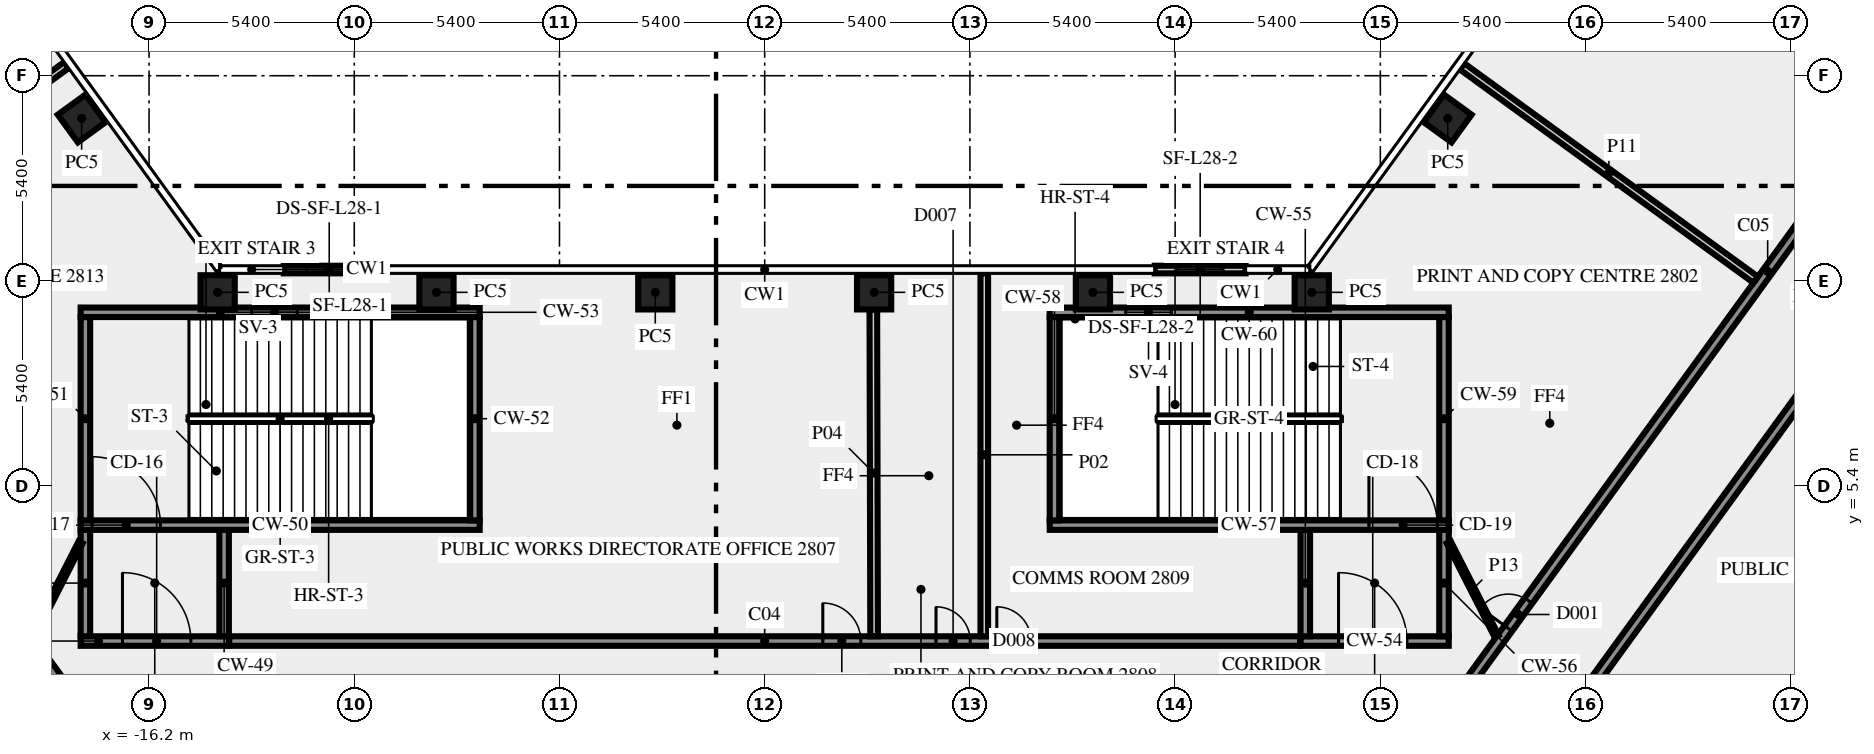
"""IFC4 building model, lengths in metres.
Left out: names, types, materials, properties, quantities, classifications, styles, units other than length and angle.
Written with IfcOpenShell. Run it as: python <this file> out.ifc"""

import sys

from ifc_helpers import new_model, si_unit, direction, frame, frame_2d, origin, origin_2d, place, context, subcontext, project, spatial, rectangle, extrude, element, fill, save


model = new_model("IFC4")
c1 = context("Model", 3, precision=1e-05, world=origin(), true_north=direction((0.0, 1.0)))
c2 = subcontext(c1, "Body", "Model", "MODEL_VIEW")
j1 = project(units=[si_unit("LENGTHUNIT", "METRE"), si_unit("PLANEANGLEUNIT", "RADIAN")], contexts=[c1])
p1 = place(None, origin())
s1 = spatial("IfcSite", under=j1, at=p1, CompositionType="ELEMENT")
p2 = place(p1, origin())
s2 = spatial("IfcBuilding", under=s1, at=p2, CompositionType="ELEMENT")
p3 = place(p2, frame((0.0, 0.0, 121.0)))
s3 = spatial("IfcBuildingStorey", under=s2, at=p3, CompositionType="ELEMENT", Elevation=121.0)
for number, where, z_axis, x_axis in (
    (1, (-17.974, 15.075, 0.0), (0.0, 0.0, 1.0), (-0.588, 0.809, 0.0)),
    (2, (17.974, 15.075, 0.0), (0.0, 0.0, 1.0), (-0.588, -0.809, 0.0)),
    (3, (14.395, 10.5, 0.0), (0.0, 0.0, 1.0), (-1.0, 0.0, 0.0)),
    (4, (8.637, 10.5, 0.0), (0.0, 0.0, 1.0), (-1.0, 0.0, 0.0)),
    (5, (2.879, 10.5, 0.0), (0.0, 0.0, 1.0), (-1.0, 0.0, 0.0)),
    (6, (-2.879, 10.5, 0.0), (0.0, 0.0, 1.0), (-1.0, 0.0, 0.0)),
    (7, (-8.637, 10.5, 0.0), (0.0, 0.0, 1.0), (-1.0, 0.0, 0.0)),
    (8, (-14.395, 10.5, 0.0), (0.0, 0.0, 1.0), (-1.0, 0.0, 0.0)),
):
    element("IfcColumn", number, at=place(p3, frame(where, z_axis=z_axis, x_axis=x_axis)), inside=s3, PredefinedType="COLUMN", context=c2, shape_type="SweptSolid", body=[
        extrude(rectangle(XDim=0.9, YDim=0.9, at=origin_2d()), origin(), (0.0, 0.0, 1.0), 3.65),
    ])
p4 = place(p3, frame((12.655, 11.1, 0.0), z_axis=(0.0, 0.0, 1.0), x_axis=(-1.0, 0.0, 0.0)))
e9 = element("IfcWall", 9, at=p4, inside=s3, PredefinedType="SOLIDWALL", context=c2, shape_type="SweptSolid", body=[
    extrude(rectangle(XDim=2.392, YDim=0.2, at=frame_2d((1.196, 0.0))), origin(), (0.0, 0.0, 1.0), 3.65),
])
p5 = place(p4, frame((0.596, 0.0, 1.0)))
e10 = element("IfcOpeningElement", 10, at=p5, cuts=e9, PredefinedType="OPENING", context=c2, shape_type="SweptSolid", body=[
    extrude(rectangle(XDim=1.2, YDim=1.2, at=frame_2d((0.6, 0.6))), frame((0.0, 0.11, 0.0), z_axis=(0.0, -1.0, 0.0), x_axis=(1.0, 0.0, 0.0)), (0.0, 0.0, 1.0), 0.22),
])
p6 = place(p3, frame((-10.263, 11.1, 0.0), z_axis=(0.0, 0.0, 1.0), x_axis=(-1.0, 0.0, 0.0)))
e11 = element("IfcWall", 11, at=p6, inside=s3, PredefinedType="SOLIDWALL", context=c2, shape_type="SweptSolid", body=[
    extrude(rectangle(XDim=2.392, YDim=0.2, at=frame_2d((1.196, 0.0))), origin(), (0.0, 0.0, 1.0), 3.65),
])
p7 = place(p6, frame((0.596, 0.0, 1.0)))
e12 = element("IfcOpeningElement", 12, at=p7, cuts=e11, PredefinedType="OPENING", context=c2, shape_type="SweptSolid", body=[
    extrude(rectangle(XDim=1.2, YDim=1.2, at=frame_2d((0.6, 0.6))), frame((0.0, 0.11, 0.0), z_axis=(0.0, -1.0, 0.0), x_axis=(1.0, 0.0, 0.0)), (0.0, 0.0, 1.0), 0.22),
])
p8 = place(p3, frame((-18.0, 1.325, 0.0), z_axis=(0.0, 0.0, 1.0), x_axis=(1.0, 0.0, 0.0)))
e13 = element("IfcWall", 13, at=p8, inside=s3, PredefinedType="SHEAR", context=c2, shape_type="SweptSolid", body=[
    extrude(rectangle(XDim=3.9, YDim=0.25, at=frame_2d((1.95, 0.0))), origin(), (0.0, 0.0, 1.0), 3.65),
])
p9 = place(p8, frame((1.1, 0.0, 0.0)))
e14 = element("IfcOpeningElement", 14, at=p9, cuts=e13, PredefinedType="OPENING", context=c2, shape_type="SweptSolid", body=[
    extrude(rectangle(XDim=1.8, YDim=2.1, at=frame_2d((0.9, 1.05))), frame((0.0, 0.135, 0.0), z_axis=(0.0, -1.0, 0.0), x_axis=(1.0, 0.0, 0.0)), (0.0, 0.0, 1.0), 0.27),
])
for number, where, z_axis, x_axis in (
    (15, (-17.875, 1.45, 0.0), (0.0, 0.0, 1.0), (0.0, 1.0, 0.0)),
    (16, (-14.225, 1.45, 0.0), (0.0, 0.0, 1.0), (0.0, 1.0, 0.0)),
):
    element("IfcWall", number, at=place(p3, frame(where, z_axis=z_axis, x_axis=x_axis)), inside=s3, PredefinedType="SHEAR", context=c2, shape_type="SweptSolid", body=[
        extrude(rectangle(XDim=2.8, YDim=0.25, at=frame_2d((1.4, 0.0))), origin(), (0.0, 0.0, 1.0), 3.65),
    ])
p10 = place(p3, frame((-18.0, 4.375, 0.0), z_axis=(0.0, 0.0, 1.0), x_axis=(1.0, 0.0, 0.0)))
e17 = element("IfcWall", 17, at=p10, inside=s3, PredefinedType="SHEAR", context=c2, shape_type="SweptSolid", body=[
    extrude(rectangle(XDim=10.5, YDim=0.25, at=frame_2d((5.25, 0.0))), origin(), (0.0, 0.0, 1.0), 3.65),
])
p11 = place(p10, frame((0.3, 0.0, 0.0)))
e18 = element("IfcOpeningElement", 18, at=p11, cuts=e17, PredefinedType="OPENING", context=c2, shape_type="SweptSolid", body=[
    extrude(rectangle(XDim=1.8, YDim=2.1, at=frame_2d((0.9, 1.05))), frame((0.0, 0.135, 0.0), z_axis=(0.0, -1.0, 0.0), x_axis=(1.0, 0.0, 0.0)), (0.0, 0.0, 1.0), 0.27),
])
for number, where, z_axis, x_axis in (
    (19, (-17.875, 4.5, 0.0), (0.0, 0.0, 1.0), (0.0, 1.0, 0.0)),
    (20, (-7.625, 4.5, 0.0), (0.0, 0.0, 1.0), (0.0, 1.0, 0.0)),
):
    element("IfcWall", number, at=place(p3, frame(where, z_axis=z_axis, x_axis=x_axis)), inside=s3, PredefinedType="SHEAR", context=c2, shape_type="SweptSolid", body=[
        extrude(rectangle(XDim=5.35, YDim=0.25, at=frame_2d((2.675, 0.0))), origin(), (0.0, 0.0, 1.0), 3.65),
    ])
p12 = place(p3, frame((-18.0, 9.975, 0.0), z_axis=(0.0, 0.0, 1.0), x_axis=(1.0, 0.0, 0.0)))
e21 = element("IfcWall", 21, at=p12, inside=s3, PredefinedType="SHEAR", context=c2, shape_type="SweptSolid", body=[
    extrude(rectangle(XDim=10.5, YDim=0.25, at=frame_2d((5.25, 0.0))), origin(), (0.0, 0.0, 1.0), 3.65),
])
p13 = place(p12, frame((4.5, 0.0, 1.0)))
e22 = element("IfcOpeningElement", 22, at=p13, cuts=e21, PredefinedType="OPENING", context=c2, shape_type="SweptSolid", body=[
    extrude(rectangle(XDim=1.2, YDim=1.2, at=frame_2d((0.6, 0.6))), frame((0.0, 0.135, 0.0), z_axis=(0.0, -1.0, 0.0), x_axis=(1.0, 0.0, 0.0)), (0.0, 0.0, 1.0), 0.27),
])
p14 = place(p3, frame((14.1, 1.325, 0.0), z_axis=(0.0, 0.0, 1.0), x_axis=(1.0, 0.0, 0.0)))
e23 = element("IfcWall", 23, at=p14, inside=s3, PredefinedType="SHEAR", context=c2, shape_type="SweptSolid", body=[
    extrude(rectangle(XDim=3.9, YDim=0.25, at=frame_2d((1.95, 0.0))), origin(), (0.0, 0.0, 1.0), 3.65),
])
p15 = place(p14, frame((1.0, 0.0, 0.0)))
e24 = element("IfcOpeningElement", 24, at=p15, cuts=e23, PredefinedType="OPENING", context=c2, shape_type="SweptSolid", body=[
    extrude(rectangle(XDim=1.8, YDim=2.1, at=frame_2d((0.9, 1.05))), frame((0.0, 0.135, 0.0), z_axis=(0.0, -1.0, 0.0), x_axis=(1.0, 0.0, 0.0)), (0.0, 0.0, 1.0), 0.27),
])
for number, where, z_axis, x_axis in (
    (25, (14.225, 1.45, 0.0), (0.0, 0.0, 1.0), (0.0, 1.0, 0.0)),
    (26, (17.875, 1.45, 0.0), (0.0, 0.0, 1.0), (0.0, 1.0, 0.0)),
):
    element("IfcWall", number, at=place(p3, frame(where, z_axis=z_axis, x_axis=x_axis)), inside=s3, PredefinedType="SHEAR", context=c2, shape_type="SweptSolid", body=[
        extrude(rectangle(XDim=2.8, YDim=0.25, at=frame_2d((1.4, 0.0))), origin(), (0.0, 0.0, 1.0), 3.65),
    ])
p16 = place(p3, frame((7.5, 4.375, 0.0), z_axis=(0.0, 0.0, 1.0), x_axis=(1.0, 0.0, 0.0)))
e27 = element("IfcWall", 27, at=p16, inside=s3, PredefinedType="SHEAR", context=c2, shape_type="SweptSolid", body=[
    extrude(rectangle(XDim=10.5, YDim=0.25, at=frame_2d((5.25, 0.0))), origin(), (0.0, 0.0, 1.0), 3.65),
])
p17 = place(p16, frame((8.4, 0.0, 0.0)))
e28 = element("IfcOpeningElement", 28, at=p17, cuts=e27, PredefinedType="OPENING", context=c2, shape_type="SweptSolid", body=[
    extrude(rectangle(XDim=1.8, YDim=2.1, at=frame_2d((0.9, 1.05))), frame((0.0, 0.135, 0.0), z_axis=(0.0, -1.0, 0.0), x_axis=(1.0, 0.0, 0.0)), (0.0, 0.0, 1.0), 0.27),
])
for number, where, z_axis, x_axis in (
    (29, (7.625, 4.5, 0.0), (0.0, 0.0, 1.0), (0.0, 1.0, 0.0)),
    (30, (17.875, 4.5, 0.0), (0.0, 0.0, 1.0), (0.0, 1.0, 0.0)),
):
    element("IfcWall", number, at=place(p3, frame(where, z_axis=z_axis, x_axis=x_axis)), inside=s3, PredefinedType="SHEAR", context=c2, shape_type="SweptSolid", body=[
        extrude(rectangle(XDim=5.35, YDim=0.25, at=frame_2d((2.675, 0.0))), origin(), (0.0, 0.0, 1.0), 3.65),
    ])
p18 = place(p3, frame((7.5, 9.975, 0.0), z_axis=(0.0, 0.0, 1.0), x_axis=(1.0, 0.0, 0.0)))
e31 = element("IfcWall", 31, at=p18, inside=s3, PredefinedType="SHEAR", context=c2, shape_type="SweptSolid", body=[
    extrude(rectangle(XDim=10.5, YDim=0.25, at=frame_2d((5.25, 0.0))), origin(), (0.0, 0.0, 1.0), 3.65),
])
p19 = place(p18, frame((2.0, 0.0, 1.0)))
e32 = element("IfcOpeningElement", 32, at=p19, cuts=e31, PredefinedType="OPENING", context=c2, shape_type="SweptSolid", body=[
    extrude(rectangle(XDim=1.2, YDim=1.2, at=frame_2d((0.6, 0.6))), frame((0.0, 0.135, 0.0), z_axis=(0.0, -1.0, 0.0), x_axis=(1.0, 0.0, 0.0)), (0.0, 0.0, 1.0), 0.27),
])
p20 = place(p3, frame((-37.232, 25.972, 0.0), z_axis=(0.0, 0.0, 1.0), x_axis=(0.587786323093, -0.809016216391, 0.0)))
e33 = element("IfcWall", 33, at=p20, inside=s3, PredefinedType="SOLIDWALL", context=c2, shape_type="SweptSolid", body=[
    extrude(rectangle(XDim=33.493, YDim=0.25, at=frame_2d((16.747, 0.0))), origin(), (0.0, 0.0, 1.0), 3.65),
])
p21 = place(p20, frame((9.785, 0.0, 0.0)))
e34 = element("IfcOpeningElement", 34, at=p21, cuts=e33, PredefinedType="OPENING", context=c2, shape_type="SweptSolid", body=[
    extrude(rectangle(XDim=1.8, YDim=2.1, at=frame_2d((0.9, 1.05))), frame((0.0, 0.135, 0.0), z_axis=(0.0, -1.0, 0.0), x_axis=(1.0, 0.0, 0.0)), (0.0, 0.0, 1.0), 0.27),
])
p22 = place(p20, frame((29.152, 0.0, 0.0)))
e35 = element("IfcOpeningElement", 35, at=p22, cuts=e33, PredefinedType="OPENING", context=c2, shape_type="SweptSolid", body=[
    extrude(rectangle(XDim=0.9, YDim=2.1, at=frame_2d((0.45, 1.05))), frame((0.0, 0.135, 0.0), z_axis=(0.0, -1.0, 0.0), x_axis=(1.0, 0.0, 0.0)), (0.0, 0.0, 1.0), 0.27),
])
p23 = place(p20, frame((1.335, 0.0, 0.0)))
e36 = element("IfcOpeningElement", 36, at=p23, cuts=e33, PredefinedType="OPENING", context=c2, shape_type="SweptSolid", body=[
    extrude(rectangle(XDim=0.9, YDim=2.1, at=frame_2d((0.45, 1.05))), frame((0.0, 0.135, 0.0), z_axis=(0.0, -1.0, 0.0), x_axis=(1.0, 0.0, 0.0)), (0.0, 0.0, 1.0), 0.27),
])
p24 = place(p3, frame((-14.09, 1.325, 0.0), z_axis=(0.0, 0.0, 1.0), x_axis=(1.0, 0.0, 0.0)))
e37 = element("IfcWall", 37, at=p24, inside=s3, PredefinedType="SOLIDWALL", context=c2, shape_type="SweptSolid", body=[
    extrude(rectangle(XDim=28.18, YDim=0.25, at=frame_2d((14.09, 0.0))), origin(), (0.0, 0.0, 1.0), 3.65),
])
p25 = place(p24, frame((20.198, 0.0, 0.0)))
e38 = element("IfcOpeningElement", 38, at=p25, cuts=e37, PredefinedType="OPENING", context=c2, shape_type="SweptSolid", body=[
    extrude(rectangle(XDim=0.9, YDim=2.1, at=frame_2d((0.45, 1.05))), frame((0.0, 0.135, 0.0), z_axis=(0.0, -1.0, 0.0), x_axis=(1.0, 0.0, 0.0)), (0.0, 0.0, 1.0), 0.27),
])
p26 = place(p24, frame((15.619, 0.0, 0.0)))
e39 = element("IfcOpeningElement", 39, at=p26, cuts=e37, PredefinedType="OPENING", context=c2, shape_type="SweptSolid", body=[
    extrude(rectangle(XDim=1.0, YDim=2.1, at=frame_2d((0.5, 1.05))), frame((0.0, 0.135, 0.0), z_axis=(0.0, -1.0, 0.0), x_axis=(1.0, 0.0, 0.0)), (0.0, 0.0, 1.0), 0.27),
])
p27 = place(p24, frame((18.598, 0.0, 0.0)))
e40 = element("IfcOpeningElement", 40, at=p27, cuts=e37, PredefinedType="OPENING", context=c2, shape_type="SweptSolid", body=[
    extrude(rectangle(XDim=0.9, YDim=2.1, at=frame_2d((0.45, 1.05))), frame((0.0, 0.135, 0.0), z_axis=(0.0, -1.0, 0.0), x_axis=(1.0, 0.0, 0.0)), (0.0, 0.0, 1.0), 0.27),
])
p28 = place(p3, frame((17.545, -1.125, 0.0), z_axis=(0.0, 0.0, 1.0), x_axis=(0.587786330937, 0.809016210693, 0.0)))
e41 = element("IfcWall", 41, at=p28, inside=s3, PredefinedType="SOLIDWALL", context=c2, shape_type="SweptSolid", body=[
    extrude(rectangle(XDim=30.103, YDim=0.25, at=frame_2d((15.052, 0.0))), origin(), (0.0, 0.0, 1.0), 3.65),
])
p29 = place(p28, frame((3.441, 0.0, 0.0)))
e42 = element("IfcOpeningElement", 42, at=p29, cuts=e41, PredefinedType="OPENING", context=c2, shape_type="SweptSolid", body=[
    extrude(rectangle(XDim=0.9, YDim=2.1, at=frame_2d((0.45, 1.05))), frame((0.0, 0.135, 0.0), z_axis=(0.0, -1.0, 0.0), x_axis=(1.0, 0.0, 0.0)), (0.0, 0.0, 1.0), 0.27),
])
p30 = place(p28, frame((28.729, 0.0, 0.0)))
e43 = element("IfcOpeningElement", 43, at=p30, cuts=e41, PredefinedType="OPENING", context=c2, shape_type="SweptSolid", body=[
    extrude(rectangle(XDim=0.9, YDim=2.1, at=frame_2d((0.45, 1.05))), frame((0.0, 0.135, 0.0), z_axis=(0.0, -1.0, 0.0), x_axis=(1.0, 0.0, 0.0)), (0.0, 0.0, 1.0), 0.27),
])
p31 = place(p3, frame((37.236, 21.469, 0.0), z_axis=(0.0, 0.0, 1.0), x_axis=(-0.58778344073, -0.809018310549, 0.0)))
e44 = element("IfcWall", 44, at=p31, inside=s3, PredefinedType="SOLIDWALL", context=c2, shape_type="SweptSolid", body=[
    extrude(rectangle(XDim=28.42, YDim=0.25, at=frame_2d((14.21, 0.0))), origin(), (0.0, 0.0, 1.0), 3.65),
])
p32 = place(p31, frame((13.205, 0.0, 0.0)))
e45 = element("IfcOpeningElement", 45, at=p32, cuts=e44, PredefinedType="OPENING", context=c2, shape_type="SweptSolid", body=[
    extrude(rectangle(XDim=1.0, YDim=2.1, at=frame_2d((0.5, 1.05))), frame((0.0, 0.135, 0.0), z_axis=(0.0, -1.0, 0.0), x_axis=(1.0, 0.0, 0.0)), (0.0, 0.0, 1.0), 0.27),
])
p33 = place(p31, frame((0.224, 0.0, 0.0)))
e46 = element("IfcOpeningElement", 46, at=p33, cuts=e44, PredefinedType="OPENING", context=c2, shape_type="SweptSolid", body=[
    extrude(rectangle(XDim=0.9, YDim=2.1, at=frame_2d((0.45, 1.05))), frame((0.0, 0.135, 0.0), z_axis=(0.0, -1.0, 0.0), x_axis=(1.0, 0.0, 0.0)), (0.0, 0.0, 1.0), 0.27),
])
p34 = place(p3, frame((5.778, 11.0, 0.0), z_axis=(0.0, 0.0, 1.0), x_axis=(0.0, -1.0, 0.0)))
e47 = element("IfcWall", 47, at=p34, inside=s3, PredefinedType="SOLIDWALL", context=c2, shape_type="SweptSolid", body=[
    extrude(rectangle(XDim=9.55, YDim=0.2, at=frame_2d((4.775, 0.0))), origin(), (0.0, 0.0, 1.0), 2.75),
])
p35 = place(p3, frame((2.879, 1.45, 0.0), z_axis=(0.0, 0.0, 1.0), x_axis=(-0.002357613104, 0.999997220826, 0.0)))
e48 = element("IfcWall", 48, at=p35, inside=s3, PredefinedType="SOLIDWALL", context=c2, shape_type="SweptSolid", body=[
    extrude(rectangle(XDim=8.595, YDim=0.2, at=frame_2d((4.297, 0.0))), origin(), (0.0, 0.0, 1.0), 3.65),
])
p36 = place(p3, frame((-26.089, 10.848, 0.0), z_axis=(0.0, 0.0, 1.0), x_axis=(0.807661302092, 0.589646691759, 0.0)))
e49 = element("IfcWall", 49, at=p36, inside=s3, PredefinedType="SOLIDWALL", context=c2, shape_type="SweptSolid", body=[
    extrude(rectangle(XDim=9.55, YDim=0.2, at=frame_2d((4.775, 0.0))), origin(), (0.0, 0.0, 1.0), 2.75),
])
p37 = place(p3, frame((26.077, 10.832, 0.0), z_axis=(0.0, 0.0, 1.0), x_axis=(-0.809052142986, 0.587736871338, 0.0)))
e50 = element("IfcWall", 50, at=p37, inside=s3, PredefinedType="SOLIDWALL", context=c2, shape_type="SweptSolid", body=[
    extrude(rectangle(XDim=9.55, YDim=0.2, at=frame_2d((4.775, 0.0))), origin(), (0.0, 0.0, 1.0), 2.75),
])
for number, where, z_axis, x_axis in (
    (51, (18.0, 3.925, 0.0), (0.0, 0.0, 1.0), (0.454, -0.891, 0.0)),
    (52, (-19.261, 1.45, 0.0), (0.0, 0.0, 1.0), (0.454, 0.891, 0.0)),
):
    element("IfcWall", number, at=place(p3, frame(where, z_axis=z_axis, x_axis=x_axis)), inside=s3, PredefinedType="PARTITIONING", context=c2, shape_type="SweptSolid", body=[
        extrude(rectangle(XDim=2.778, YDim=0.12, at=frame_2d((1.389, 0.0))), origin(), (0.0, 0.0, 1.0), 3.65),
    ])
p38 = place(p5, origin())
e53 = element("IfcWindow", 53, at=p38, inside=s3, PartitioningType="SINGLE_PANEL", PredefinedType="WINDOW", context=c2, shape_type="SweptSolid", body=[
    extrude(rectangle(XDim=1.2, YDim=1.2, at=frame_2d((0.6, 0.6))), frame((0.0, 0.03, 0.0), z_axis=(0.0, -1.0, 0.0), x_axis=(1.0, 0.0, 0.0)), (0.0, 0.0, 1.0), 0.06),
])
fill(e10, e53)
p39 = place(p7, origin())
e54 = element("IfcWindow", 54, at=p39, inside=s3, PartitioningType="SINGLE_PANEL", PredefinedType="WINDOW", context=c2, shape_type="SweptSolid", body=[
    extrude(rectangle(XDim=1.2, YDim=1.2, at=frame_2d((0.6, 0.6))), frame((0.0, 0.03, 0.0), z_axis=(0.0, -1.0, 0.0), x_axis=(1.0, 0.0, 0.0)), (0.0, 0.0, 1.0), 0.06),
])
fill(e12, e54)
p40 = place(p9, origin())
e55 = element("IfcDoor", 55, at=p40, inside=s3, OperationType="DOUBLE_DOOR_SINGLE_SWING", PredefinedType="DOOR", context=c2, shape_type="SweptSolid", body=[
    extrude(rectangle(XDim=1.8, YDim=2.1, at=frame_2d((0.9, 1.05))), frame((0.0, 0.025, 0.0), z_axis=(0.0, -1.0, 0.0), x_axis=(1.0, 0.0, 0.0)), (0.0, 0.0, 1.0), 0.05),
])
fill(e14, e55)
p41 = place(p11, origin())
e56 = element("IfcDoor", 56, at=p41, inside=s3, OperationType="DOUBLE_DOOR_SINGLE_SWING", PredefinedType="DOOR", context=c2, shape_type="SweptSolid", body=[
    extrude(rectangle(XDim=1.8, YDim=2.1, at=frame_2d((0.9, 1.05))), frame((0.0, 0.025, 0.0), z_axis=(0.0, -1.0, 0.0), x_axis=(1.0, 0.0, 0.0)), (0.0, 0.0, 1.0), 0.05),
])
fill(e18, e56)
p42 = place(p13, origin())
e57 = element("IfcWindow", 57, at=p42, inside=s3, PartitioningType="SINGLE_PANEL", PredefinedType="WINDOW", context=c2, shape_type="SweptSolid", body=[
    extrude(rectangle(XDim=1.2, YDim=1.2, at=frame_2d((0.6, 0.6))), frame((0.0, 0.03, 0.0), z_axis=(0.0, -1.0, 0.0), x_axis=(1.0, 0.0, 0.0)), (0.0, 0.0, 1.0), 0.06),
])
fill(e22, e57)
p43 = place(p15, origin())
e58 = element("IfcDoor", 58, at=p43, inside=s3, OperationType="DOUBLE_DOOR_SINGLE_SWING", PredefinedType="DOOR", context=c2, shape_type="SweptSolid", body=[
    extrude(rectangle(XDim=1.8, YDim=2.1, at=frame_2d((0.9, 1.05))), frame((0.0, 0.025, 0.0), z_axis=(0.0, -1.0, 0.0), x_axis=(1.0, 0.0, 0.0)), (0.0, 0.0, 1.0), 0.05),
])
fill(e24, e58)
p44 = place(p17, origin())
e59 = element("IfcDoor", 59, at=p44, inside=s3, OperationType="DOUBLE_DOOR_SINGLE_SWING", PredefinedType="DOOR", context=c2, shape_type="SweptSolid", body=[
    extrude(rectangle(XDim=1.8, YDim=2.1, at=frame_2d((0.9, 1.05))), frame((0.0, 0.025, 0.0), z_axis=(0.0, -1.0, 0.0), x_axis=(1.0, 0.0, 0.0)), (0.0, 0.0, 1.0), 0.05),
])
fill(e28, e59)
p45 = place(p19, origin())
e60 = element("IfcWindow", 60, at=p45, inside=s3, PartitioningType="SINGLE_PANEL", PredefinedType="WINDOW", context=c2, shape_type="SweptSolid", body=[
    extrude(rectangle(XDim=1.2, YDim=1.2, at=frame_2d((0.6, 0.6))), frame((0.0, 0.03, 0.0), z_axis=(0.0, -1.0, 0.0), x_axis=(1.0, 0.0, 0.0)), (0.0, 0.0, 1.0), 0.06),
])
fill(e32, e60)
p46 = place(p25, origin())
e61 = element("IfcDoor", 61, at=p46, inside=s3, OperationType="SINGLE_SWING_LEFT", PredefinedType="DOOR", context=c2, shape_type="SweptSolid", body=[
    extrude(rectangle(XDim=0.9, YDim=2.1, at=frame_2d((0.45, 1.05))), frame((0.0, 0.025, 0.0), z_axis=(0.0, -1.0, 0.0), x_axis=(1.0, 0.0, 0.0)), (0.0, 0.0, 1.0), 0.05),
])
fill(e38, e61)
p47 = place(p26, origin())
e62 = element("IfcDoor", 62, at=p47, inside=s3, OperationType="SINGLE_SWING_RIGHT", PredefinedType="DOOR", context=c2, shape_type="SweptSolid", body=[
    extrude(rectangle(XDim=1.0, YDim=2.1, at=frame_2d((0.5, 1.05))), frame((0.0, 0.025, 0.0), z_axis=(0.0, -1.0, 0.0), x_axis=(1.0, 0.0, 0.0)), (0.0, 0.0, 1.0), 0.05),
])
fill(e39, e62)
p48 = place(p29, origin())
e63 = element("IfcDoor", 63, at=p48, inside=s3, OperationType="SINGLE_SWING_LEFT", PredefinedType="DOOR", context=c2, shape_type="SweptSolid", body=[
    extrude(rectangle(XDim=0.9, YDim=2.1, at=frame_2d((0.45, 1.05))), frame((0.0, 0.025, 0.0), z_axis=(0.0, -1.0, 0.0), x_axis=(1.0, 0.0, 0.0)), (0.0, 0.0, 1.0), 0.05),
])
fill(e42, e63)
p49 = place(p27, origin())
e64 = element("IfcDoor", 64, at=p49, inside=s3, OperationType="SINGLE_SWING_RIGHT", PredefinedType="DOOR", context=c2, shape_type="SweptSolid", body=[
    extrude(rectangle(XDim=0.9, YDim=2.1, at=frame_2d((0.45, 1.05))), frame((0.0, 0.025, 0.0), z_axis=(0.0, -1.0, 0.0), x_axis=(1.0, 0.0, 0.0)), (0.0, 0.0, 1.0), 0.05),
])
fill(e40, e64)
save(model, sys.argv[1])
